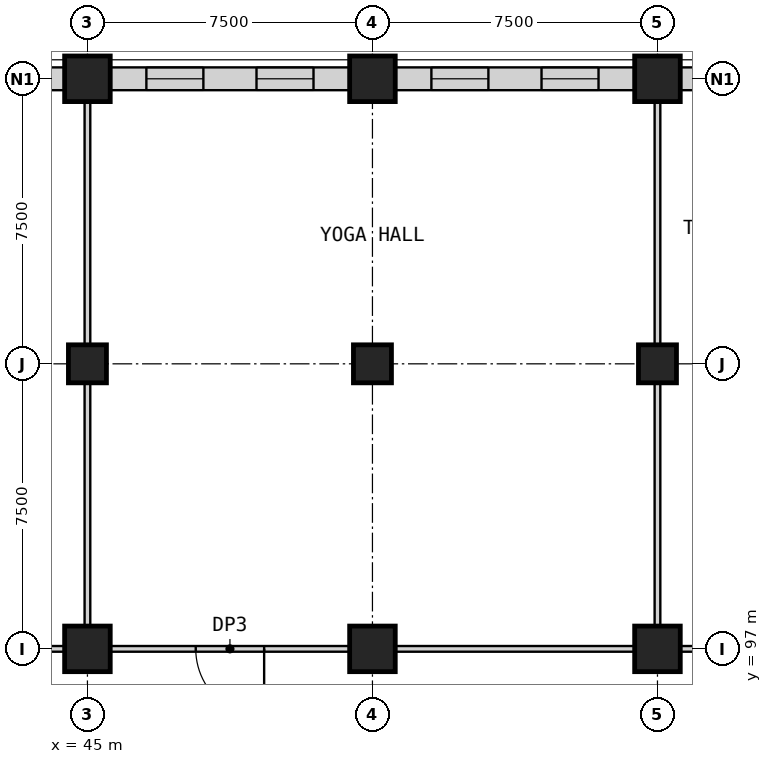
"""IFC4 building model, lengths in metres.
Left out: names, types, materials, properties, quantities, classifications, styles, units other than length and angle.
Written with IfcOpenShell. Run it as: python <this file> out.ifc"""

import sys

from ifc_helpers import new_model, si_unit, direction, frame, frame_2d, origin, origin_2d, place, context, subcontext, project, spatial, rectangle, extrude, element, fill, save


model = new_model("IFC4")
c1 = context("Model", 3, precision=1e-05, world=origin(), true_north=direction((0.0, 1.0)))
c2 = subcontext(c1, "Body", "Model", "MODEL_VIEW")
j1 = project(units=[si_unit("LENGTHUNIT", "METRE"), si_unit("PLANEANGLEUNIT", "RADIAN")], contexts=[c1])
p1 = place(None, origin())
s1 = spatial("IfcSite", under=j1, at=p1, CompositionType="ELEMENT")
p2 = place(p1, origin())
s2 = spatial("IfcBuilding", under=s1, at=p2, CompositionType="ELEMENT")
p3 = place(p2, frame((0.0, 0.0, 29.0)))
s3 = spatial("IfcBuildingStorey", under=s2, at=p3, CompositionType="ELEMENT", Elevation=29.0)
p4 = place(p3, frame((45.0, 97.0, 0.0), z_axis=(0.0, 0.0, 1.0), x_axis=(1.0, 0.0, 0.0)))
e1 = element("IfcColumn", 1, at=p4, inside=s3, PredefinedType="COLUMN", context=c2, shape_type="SweptSolid", body=[
    extrude(rectangle(XDim=1.2, YDim=1.2, at=origin_2d()), origin(), (0.0, 0.0, 1.0), 5.0),
])
p5 = place(p3, frame((45.0, 104.5, 0.0), z_axis=(0.0, 0.0, 1.0), x_axis=(1.0, 0.0, 0.0)))
e2 = element("IfcColumn", 2, at=p5, inside=s3, PredefinedType="COLUMN", context=c2, shape_type="SweptSolid", body=[
    extrude(rectangle(XDim=1.0, YDim=1.0, at=origin_2d()), origin(), (0.0, 0.0, 1.0), 5.0),
])
p6 = place(p3, frame((52.5, 97.0, 0.0), z_axis=(0.0, 0.0, 1.0), x_axis=(1.0, 0.0, 0.0)))
e3 = element("IfcColumn", 3, at=p6, inside=s3, PredefinedType="COLUMN", context=c2, shape_type="SweptSolid", body=[
    extrude(rectangle(XDim=1.2, YDim=1.2, at=origin_2d()), origin(), (0.0, 0.0, 1.0), 5.0),
])
p7 = place(p3, frame((52.5, 104.5, 0.0), z_axis=(0.0, 0.0, 1.0), x_axis=(1.0, 0.0, 0.0)))
e4 = element("IfcColumn", 4, at=p7, inside=s3, PredefinedType="COLUMN", context=c2, shape_type="SweptSolid", body=[
    extrude(rectangle(XDim=1.0, YDim=1.0, at=origin_2d()), origin(), (0.0, 0.0, 1.0), 5.0),
])
p8 = place(p3, frame((60.0, 97.0, 0.0), z_axis=(0.0, 0.0, 1.0), x_axis=(1.0, 0.0, 0.0)))
e5 = element("IfcColumn", 5, at=p8, inside=s3, PredefinedType="COLUMN", context=c2, shape_type="SweptSolid", body=[
    extrude(rectangle(XDim=1.2, YDim=1.2, at=origin_2d()), origin(), (0.0, 0.0, 1.0), 5.0),
])
p9 = place(p3, frame((60.0, 104.5, 0.0), z_axis=(0.0, 0.0, 1.0), x_axis=(1.0, 0.0, 0.0)))
e6 = element("IfcColumn", 6, at=p9, inside=s3, PredefinedType="COLUMN", context=c2, shape_type="SweptSolid", body=[
    extrude(rectangle(XDim=1.0, YDim=1.0, at=origin_2d()), origin(), (0.0, 0.0, 1.0), 5.0),
])
for number, where, z_axis, x_axis in (
    (7, (45.0, 112.0, 0.0), (0.0, 0.0, 1.0), (1.0, 0.0, 0.0)),
    (8, (52.5, 112.0, 0.0), (0.0, 0.0, 1.0), (1.0, 0.0, 0.0)),
    (9, (60.0, 112.0, 0.0), (0.0, 0.0, 1.0), (1.0, 0.0, 0.0)),
):
    element("IfcColumn", number, at=place(p3, frame(where, z_axis=z_axis, x_axis=x_axis)), inside=s3, PredefinedType="COLUMN", context=c2, shape_type="SweptSolid", body=[
        extrude(rectangle(XDim=1.2, YDim=1.2, at=origin_2d()), origin(), (0.0, 0.0, 1.0), 5.0),
    ])
p10 = place(p3, frame((38.1, 97.0, 0.0), z_axis=(0.0, 0.0, 1.0), x_axis=(1.0, 0.0, 0.0)))
e10 = element("IfcWall", 10, at=p10, inside=s3, PredefinedType="PARTITIONING", context=c2, shape_type="SweptSolid", body=[
    extrude(rectangle(XDim=6.3, YDim=0.15, at=frame_2d((3.15, 0.0))), origin(), (0.0, 0.0, 1.0), 4.7),
])
p11 = place(p3, frame((51.9, 97.0, 0.0), z_axis=(0.0, 0.0, 1.0), x_axis=(-1.0, 0.0, 0.0)))
e11 = element("IfcWall", 11, at=p11, inside=s3, PredefinedType="PARTITIONING", context=c2, shape_type="SweptSolid", body=[
    extrude(rectangle(XDim=6.3, YDim=0.15, at=frame_2d((3.15, 0.0))), origin(), (0.0, 0.0, 1.0), 4.7),
])
p12 = place(p11, frame((2.25, 0.0, 0.0)))
e12 = element("IfcOpeningElement", 12, at=p12, cuts=e11, PredefinedType="OPENING", context=c2, shape_type="SweptSolid", body=[
    extrude(rectangle(XDim=1.8, YDim=2.4, at=frame_2d((0.9, 1.2))), frame((0.0, 0.085, 0.0), z_axis=(0.0, -1.0, 0.0), x_axis=(1.0, 0.0, 0.0)), (0.0, 0.0, 1.0), 0.17),
])
p13 = place(p3, frame((53.1, 97.0, 0.0), z_axis=(0.0, 0.0, 1.0), x_axis=(1.0, 0.0, 0.0)))
e13 = element("IfcWall", 13, at=p13, inside=s3, PredefinedType="PARTITIONING", context=c2, shape_type="SweptSolid", body=[
    extrude(rectangle(XDim=6.3, YDim=0.15, at=frame_2d((3.15, 0.0))), origin(), (0.0, 0.0, 1.0), 4.7),
])
p14 = place(p3, frame((63.675, 97.0, 0.0), z_axis=(0.0, 0.0, 1.0), x_axis=(-1.0, 0.0, 0.0)))
e14 = element("IfcWall", 14, at=p14, inside=s3, PredefinedType="PARTITIONING", context=c2, shape_type="SweptSolid", body=[
    extrude(rectangle(XDim=3.075, YDim=0.15, at=frame_2d((1.538, 0.0))), origin(), (0.0, 0.0, 1.0), 4.7),
])
p15 = place(p14, frame((1.325, 0.0, 0.0)))
e15 = element("IfcOpeningElement", 15, at=p15, cuts=e14, PredefinedType="OPENING", context=c2, shape_type="SweptSolid", body=[
    extrude(rectangle(XDim=1.0, YDim=2.1, at=frame_2d((0.5, 1.05))), frame((0.0, 0.085, 0.0), z_axis=(0.0, -1.0, 0.0), x_axis=(1.0, 0.0, 0.0)), (0.0, 0.0, 1.0), 0.17),
])
p16 = place(p3, frame((38.1, 112.0, 0.0), z_axis=(0.0, 0.0, 1.0), x_axis=(1.0, 0.0, 0.0)))
e16 = element("IfcWall", 16, at=p16, inside=s3, PredefinedType="PARTITIONING", context=c2, shape_type="SweptSolid", body=[
    extrude(rectangle(XDim=6.3, YDim=0.6, at=frame_2d((3.15, 0.0))), origin(), (0.0, 0.0, 1.0), 4.7),
])
p17 = place(p16, frame((0.951, 0.0, 0.9)))
e17 = element("IfcOpeningElement", 17, at=p17, cuts=e16, PredefinedType="OPENING", context=c2, shape_type="SweptSolid", body=[
    extrude(rectangle(XDim=1.5, YDim=2.8, at=frame_2d((0.75, 1.4))), frame((0.0, 0.31, 0.0), z_axis=(0.0, -1.0, 0.0), x_axis=(1.0, 0.0, 0.0)), (0.0, 0.0, 1.0), 0.62),
])
p18 = place(p16, frame((3.849, 0.0, 0.9)))
e18 = element("IfcOpeningElement", 18, at=p18, cuts=e16, PredefinedType="OPENING", context=c2, shape_type="SweptSolid", body=[
    extrude(rectangle(XDim=1.5, YDim=2.8, at=frame_2d((0.75, 1.4))), frame((0.0, 0.31, 0.0), z_axis=(0.0, -1.0, 0.0), x_axis=(1.0, 0.0, 0.0)), (0.0, 0.0, 1.0), 0.62),
])
p19 = place(p3, frame((45.6, 112.0, 0.0), z_axis=(0.0, 0.0, 1.0), x_axis=(1.0, 0.0, 0.0)))
e19 = element("IfcWall", 19, at=p19, inside=s3, PredefinedType="PARTITIONING", context=c2, shape_type="SweptSolid", body=[
    extrude(rectangle(XDim=6.3, YDim=0.6, at=frame_2d((3.15, 0.0))), origin(), (0.0, 0.0, 1.0), 4.7),
])
p20 = place(p19, frame((0.951, 0.0, 0.9)))
e20 = element("IfcOpeningElement", 20, at=p20, cuts=e19, PredefinedType="OPENING", context=c2, shape_type="SweptSolid", body=[
    extrude(rectangle(XDim=1.5, YDim=2.8, at=frame_2d((0.75, 1.4))), frame((0.0, 0.31, 0.0), z_axis=(0.0, -1.0, 0.0), x_axis=(1.0, 0.0, 0.0)), (0.0, 0.0, 1.0), 0.62),
])
p21 = place(p19, frame((3.849, 0.0, 0.9)))
e21 = element("IfcOpeningElement", 21, at=p21, cuts=e19, PredefinedType="OPENING", context=c2, shape_type="SweptSolid", body=[
    extrude(rectangle(XDim=1.5, YDim=2.8, at=frame_2d((0.75, 1.4))), frame((0.0, 0.31, 0.0), z_axis=(0.0, -1.0, 0.0), x_axis=(1.0, 0.0, 0.0)), (0.0, 0.0, 1.0), 0.62),
])
p22 = place(p3, frame((53.1, 112.0, 0.0), z_axis=(0.0, 0.0, 1.0), x_axis=(1.0, 0.0, 0.0)))
e22 = element("IfcWall", 22, at=p22, inside=s3, PredefinedType="PARTITIONING", context=c2, shape_type="SweptSolid", body=[
    extrude(rectangle(XDim=6.3, YDim=0.6, at=frame_2d((3.15, 0.0))), origin(), (0.0, 0.0, 1.0), 4.7),
])
p23 = place(p22, frame((0.951, 0.0, 0.9)))
e23 = element("IfcOpeningElement", 23, at=p23, cuts=e22, PredefinedType="OPENING", context=c2, shape_type="SweptSolid", body=[
    extrude(rectangle(XDim=1.5, YDim=2.8, at=frame_2d((0.75, 1.4))), frame((0.0, 0.31, 0.0), z_axis=(0.0, -1.0, 0.0), x_axis=(1.0, 0.0, 0.0)), (0.0, 0.0, 1.0), 0.62),
])
p24 = place(p22, frame((3.849, 0.0, 0.9)))
e24 = element("IfcOpeningElement", 24, at=p24, cuts=e22, PredefinedType="OPENING", context=c2, shape_type="SweptSolid", body=[
    extrude(rectangle(XDim=1.5, YDim=2.8, at=frame_2d((0.75, 1.4))), frame((0.0, 0.31, 0.0), z_axis=(0.0, -1.0, 0.0), x_axis=(1.0, 0.0, 0.0)), (0.0, 0.0, 1.0), 0.62),
])
p25 = place(p3, frame((60.6, 112.0, 0.0), z_axis=(0.0, 0.0, 1.0), x_axis=(1.0, 0.0, 0.0)))
e25 = element("IfcWall", 25, at=p25, inside=s3, PredefinedType="PARTITIONING", context=c2, shape_type="SweptSolid", body=[
    extrude(rectangle(XDim=3.15, YDim=0.6, at=frame_2d((1.575, 0.0))), origin(), (0.0, 0.0, 1.0), 4.7),
])
p26 = place(p25, frame((0.975, 0.0, 0.9)))
e26 = element("IfcOpeningElement", 26, at=p26, cuts=e25, PredefinedType="OPENING", context=c2, shape_type="SweptSolid", body=[
    extrude(rectangle(XDim=1.2, YDim=2.8, at=frame_2d((0.6, 1.4))), frame((0.0, 0.31, 0.0), z_axis=(0.0, -1.0, 0.0), x_axis=(1.0, 0.0, 0.0)), (0.0, 0.0, 1.0), 0.62),
])
for number, where, z_axis, x_axis in (
    (27, (45.0, 97.6, 0.0), (0.0, 0.0, 1.0), (0.0, 1.0, 0.0)),
    (28, (45.0, 105.0, 0.0), (0.0, 0.0, 1.0), (0.0, 1.0, 0.0)),
    (29, (60.0, 97.6, 0.0), (0.0, 0.0, 1.0), (0.0, 1.0, 0.0)),
    (30, (60.0, 105.0, 0.0), (0.0, 0.0, 1.0), (0.0, 1.0, 0.0)),
):
    element("IfcWall", number, at=place(p3, frame(where, z_axis=z_axis, x_axis=x_axis)), inside=s3, PredefinedType="PARTITIONING", context=c2, shape_type="SweptSolid", body=[
        extrude(rectangle(XDim=6.4, YDim=0.15, at=frame_2d((3.2, 0.0))), origin(), (0.0, 0.0, 1.0), 4.7),
    ])
p27 = place(p12, origin())
e31 = element("IfcDoor", 31, at=p27, inside=s3, OperationType="SINGLE_SWING_LEFT", PredefinedType="DOOR", context=c2, shape_type="SweptSolid", body=[
    extrude(rectangle(XDim=1.8, YDim=2.4, at=frame_2d((0.9, 1.2))), frame((0.0, 0.025, 0.0), z_axis=(0.0, -1.0, 0.0), x_axis=(1.0, 0.0, 0.0)), (0.0, 0.0, 1.0), 0.05),
])
fill(e12, e31)
p28 = place(p20, origin())
e32 = element("IfcWindow", 32, at=p28, inside=s3, PartitioningType="SINGLE_PANEL", PredefinedType="WINDOW", context=c2, shape_type="SweptSolid", body=[
    extrude(rectangle(XDim=1.5, YDim=2.8, at=frame_2d((0.75, 1.4))), frame((0.0, 0.03, 0.0), z_axis=(0.0, -1.0, 0.0), x_axis=(1.0, 0.0, 0.0)), (0.0, 0.0, 1.0), 0.06),
])
fill(e20, e32)
p29 = place(p21, origin())
e33 = element("IfcWindow", 33, at=p29, inside=s3, PartitioningType="SINGLE_PANEL", PredefinedType="WINDOW", context=c2, shape_type="SweptSolid", body=[
    extrude(rectangle(XDim=1.5, YDim=2.8, at=frame_2d((0.75, 1.4))), frame((0.0, 0.03, 0.0), z_axis=(0.0, -1.0, 0.0), x_axis=(1.0, 0.0, 0.0)), (0.0, 0.0, 1.0), 0.06),
])
fill(e21, e33)
p30 = place(p23, origin())
e34 = element("IfcWindow", 34, at=p30, inside=s3, PartitioningType="SINGLE_PANEL", PredefinedType="WINDOW", context=c2, shape_type="SweptSolid", body=[
    extrude(rectangle(XDim=1.5, YDim=2.8, at=frame_2d((0.75, 1.4))), frame((0.0, 0.03, 0.0), z_axis=(0.0, -1.0, 0.0), x_axis=(1.0, 0.0, 0.0)), (0.0, 0.0, 1.0), 0.06),
])
fill(e23, e34)
p31 = place(p24, origin())
e35 = element("IfcWindow", 35, at=p31, inside=s3, PartitioningType="SINGLE_PANEL", PredefinedType="WINDOW", context=c2, shape_type="SweptSolid", body=[
    extrude(rectangle(XDim=1.5, YDim=2.8, at=frame_2d((0.75, 1.4))), frame((0.0, 0.03, 0.0), z_axis=(0.0, -1.0, 0.0), x_axis=(1.0, 0.0, 0.0)), (0.0, 0.0, 1.0), 0.06),
])
fill(e24, e35)
save(model, sys.argv[1])
